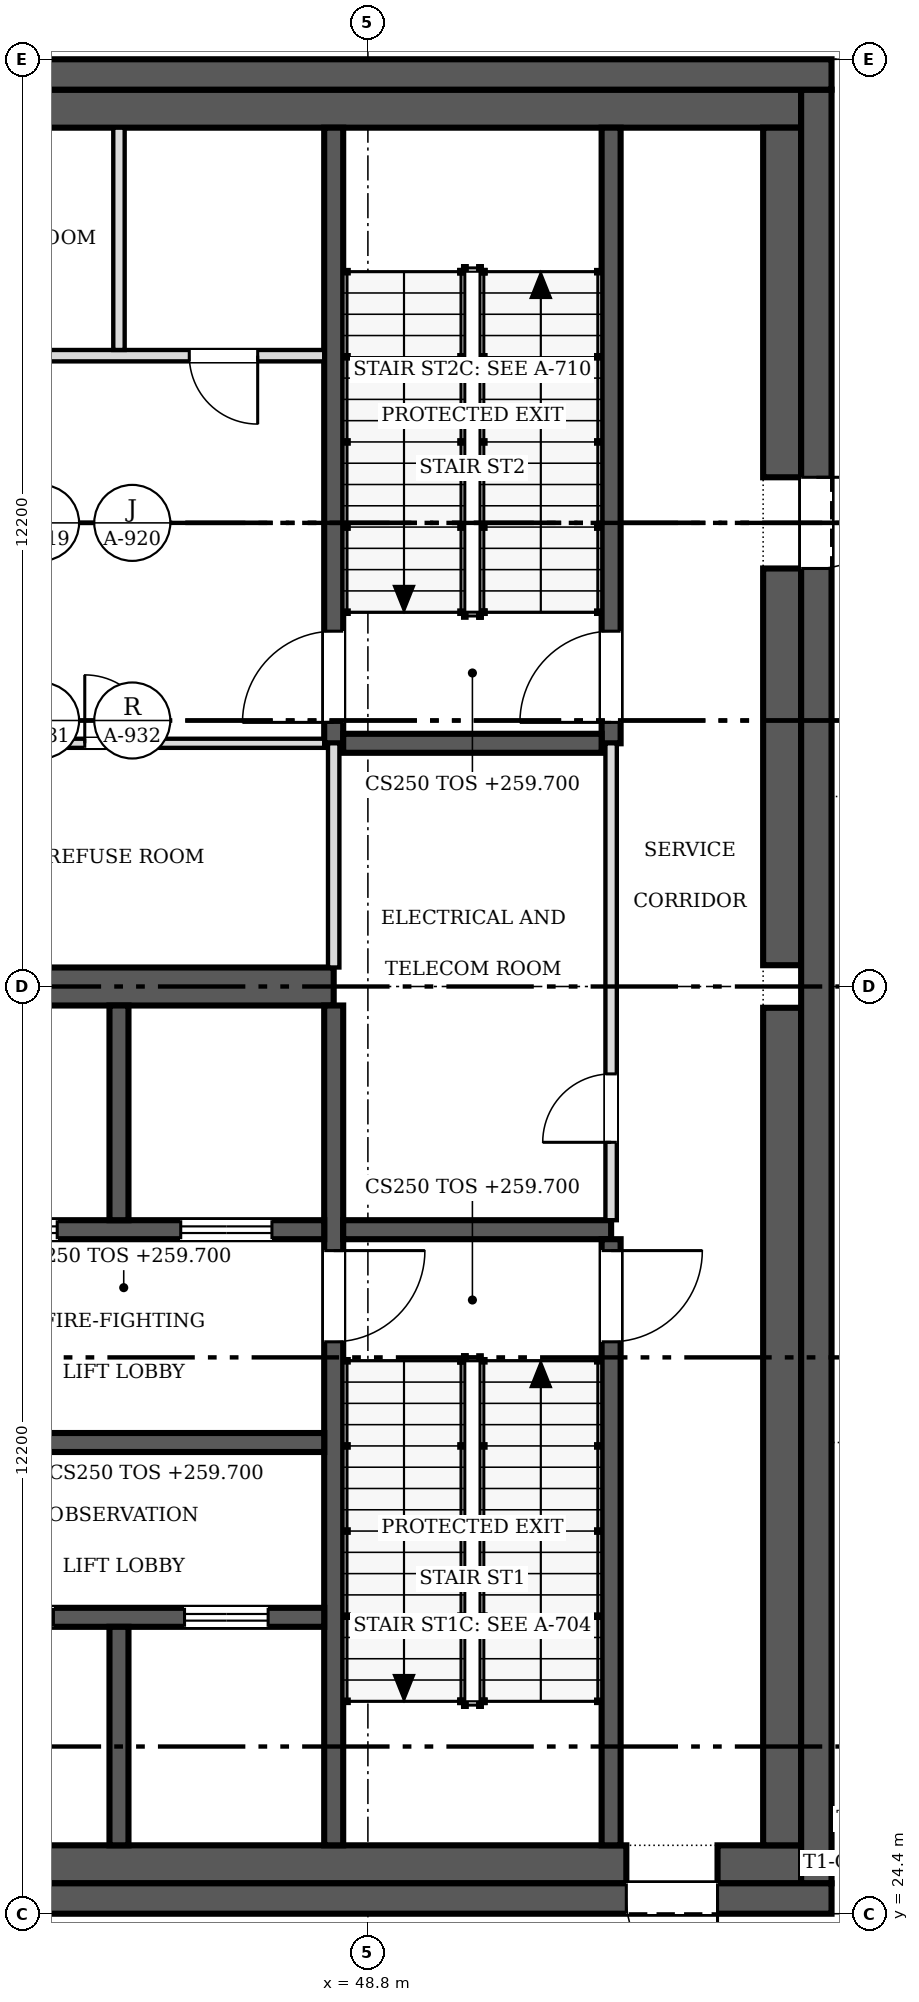
"""IFC4 building model, lengths in metres.
Left out: names, types, materials, properties, quantities, classifications, styles, units other than length and angle.
Written with IfcOpenShell. Run it as: python <this file> out.ifc"""

import sys

from ifc_helpers import new_model, si_unit, direction, frame, frame_2d, origin, place, context, subcontext, project, spatial, rectangle, extrude, source, transform, mapped, element, fill, save


model = new_model("IFC4")
c1 = context("Model", 3, precision=1e-05, world=origin(), true_north=direction((0.0, 1.0)))
c2 = subcontext(c1, "Body", "Model", "MODEL_VIEW")
j1 = project(units=[si_unit("LENGTHUNIT", "METRE"), si_unit("PLANEANGLEUNIT", "RADIAN")], contexts=[c1])
p1 = place(None, origin())
s1 = spatial("IfcSite", under=j1, at=p1, CompositionType="ELEMENT")
p2 = place(p1, origin())
s2 = spatial("IfcBuilding", under=s1, at=p2, CompositionType="ELEMENT")
p3 = place(p2, frame((0.0, 0.0, 259.7)))
s3 = spatial("IfcBuildingStorey", under=s2, at=p3, CompositionType="ELEMENT", Elevation=259.7)
p4 = place(p3, frame((54.9, 24.6, 0.0), z_axis=(0.0, 0.0, 1.0), x_axis=(-1.0, 0.0, 0.0)))
e1 = element("IfcWall", 1, at=p4, inside=s3, PredefinedType="SHEAR", context=c2, shape_type="SweptSolid", body=[
    extrude(rectangle(XDim=24.4, YDim=0.4, at=frame_2d((12.2, 0.0))), origin(), (0.0, 0.0, 1.0), 6.0),
])
m1 = source(origin(), c2, "Body", "SweptSolid", [
    extrude(rectangle(XDim=1.2, YDim=2.1, at=frame_2d((0.6, 1.05))), frame((0.0, 0.21, 0.0), z_axis=(0.0, -1.0, 0.0), x_axis=(1.0, 0.0, 0.0)), (0.0, 0.0, 1.0), 0.42),
])
p5 = place(p4, frame((1.5, 0.0, 0.0)))
e2 = element("IfcOpeningElement", 2, at=p5, cuts=e1, PredefinedType="OPENING", context=c2, shape_type="MappedRepresentation", body=[
    mapped(m1, transform((0.0, 0.0, 0.0), scale=1.0)),
])
p6 = place(p3, frame((30.5, 48.6, 0.0), z_axis=(0.0, 0.0, 1.0), x_axis=(1.0, 0.0, 0.0)))
e3 = element("IfcWall", 3, at=p6, inside=s3, PredefinedType="SHEAR", context=c2, shape_type="SweptSolid", body=[
    extrude(rectangle(XDim=24.4, YDim=0.4, at=frame_2d((12.2, 0.0))), origin(), (0.0, 0.0, 1.0), 6.0),
])
p7 = place(p3, frame((54.7, 48.4, 0.0), z_axis=(0.0, 0.0, 1.0), x_axis=(0.0, -1.0, 0.0)))
e4 = element("IfcWall", 4, at=p7, inside=s3, PredefinedType="SHEAR", context=c2, shape_type="SweptSolid", body=[
    extrude(rectangle(XDim=23.6, YDim=0.4, at=frame_2d((11.8, 0.0))), origin(), (0.0, 0.0, 1.0), 6.0),
])
p8 = place(p7, frame((5.1, 0.0, 0.0)))
e5 = element("IfcOpeningElement", 5, at=p8, cuts=e4, PredefinedType="OPENING", context=c2, shape_type="MappedRepresentation", body=[
    mapped(m1, transform((0.0, 0.0, 0.0), scale=1.0)),
])
p9 = place(p3, frame((30.9, 25.05, 0.0), z_axis=(0.0, 0.0, 1.0), x_axis=(1.0, 0.0, 0.0)))
e6 = element("IfcWall", 6, at=p9, inside=s3, PredefinedType="SOLIDWALL", context=c2, shape_type="SweptSolid", body=[
    extrude(rectangle(XDim=21.3, YDim=0.5, at=frame_2d((10.65, 0.0))), origin(), (0.0, 0.0, 1.0), 6.0),
])
p10 = place(p3, frame((53.4, 25.05, 0.0), z_axis=(0.0, 0.0, 1.0), x_axis=(1.0, 0.0, 0.0)))
e7 = element("IfcWall", 7, at=p10, inside=s3, PredefinedType="SOLIDWALL", context=c2, shape_type="SweptSolid", body=[
    extrude(rectangle(XDim=1.1, YDim=0.5, at=frame_2d((0.55, 0.0))), origin(), (0.0, 0.0, 1.0), 6.0),
])
p11 = place(p3, frame((30.9, 48.15, 0.0), z_axis=(0.0, 0.0, 1.0), x_axis=(1.0, 0.0, 0.0)))
e8 = element("IfcWall", 8, at=p11, inside=s3, PredefinedType="SOLIDWALL", context=c2, shape_type="SweptSolid", body=[
    extrude(rectangle(XDim=23.6, YDim=0.5, at=frame_2d((11.8, 0.0))), origin(), (0.0, 0.0, 1.0), 6.0),
])
p12 = place(p3, frame((54.25, 25.3, 0.0), z_axis=(0.0, 0.0, 1.0), x_axis=(0.0, 1.0, 0.0)))
e9 = element("IfcWall", 9, at=p12, inside=s3, PredefinedType="SOLIDWALL", context=c2, shape_type="SweptSolid", body=[
    extrude(rectangle(XDim=11.02, YDim=0.5, at=frame_2d((5.51, 0.0))), origin(), (0.0, 0.0, 1.0), 6.0),
])
p13 = place(p3, frame((54.25, 36.88, 0.0), z_axis=(0.0, 0.0, 1.0), x_axis=(0.0, 1.0, 0.0)))
e10 = element("IfcWall", 10, at=p13, inside=s3, PredefinedType="SOLIDWALL", context=c2, shape_type="SweptSolid", body=[
    extrude(rectangle(XDim=5.22, YDim=0.5, at=frame_2d((2.61, 0.0))), origin(), (0.0, 0.0, 1.0), 6.0),
])
p14 = place(p3, frame((54.25, 43.3, 0.0), z_axis=(0.0, 0.0, 1.0), x_axis=(0.0, 1.0, 0.0)))
e11 = element("IfcWall", 11, at=p14, inside=s3, PredefinedType="SOLIDWALL", context=c2, shape_type="SweptSolid", body=[
    extrude(rectangle(XDim=4.6, YDim=0.5, at=frame_2d((2.3, 0.0))), origin(), (0.0, 0.0, 1.0), 6.0),
])
p15 = place(p3, frame((31.4, 36.6, 0.0), z_axis=(0.0, 0.0, 1.0), x_axis=(1.0, 0.0, 0.0)))
e12 = element("IfcWall", 12, at=p15, inside=s3, PredefinedType="SHEAR", context=c2, shape_type="SweptSolid", body=[
    extrude(rectangle(XDim=16.95, YDim=0.5, at=frame_2d((8.475, 0.0))), origin(), (0.0, 0.0, 1.0), 6.0),
])
p16 = place(p3, frame((48.35, 36.35, 0.0), z_axis=(0.0, 0.0, 1.0), x_axis=(0.0, -1.0, 0.0)))
e13 = element("IfcWall", 13, at=p16, inside=s3, PredefinedType="SOLIDWALL", context=c2, shape_type="SweptSolid", body=[
    extrude(rectangle(XDim=11.05, YDim=0.25, at=frame_2d((5.525, 0.0))), origin(), (0.0, 0.0, 1.0), 6.0),
])
m2 = source(origin(), c2, "Body", "SweptSolid", [
    extrude(rectangle(XDim=1.2, YDim=2.1, at=frame_2d((0.6, 1.05))), frame((0.0, 0.135, 0.0), z_axis=(0.0, -1.0, 0.0), x_axis=(1.0, 0.0, 0.0)), (0.0, 0.0, 1.0), 0.27),
])
p17 = place(p16, frame((3.225, 0.0, 0.0)))
e14 = element("IfcOpeningElement", 14, at=p17, cuts=e13, PredefinedType="OPENING", context=c2, shape_type="MappedRepresentation", body=[
    mapped(m2, transform((0.0, 0.0, 0.0), scale=1.0)),
])
p18 = place(p3, frame((48.225, 33.4, 0.0), z_axis=(0.0, 0.0, 1.0), x_axis=(-1.0, 0.0, 0.0)))
e15 = element("IfcWall", 15, at=p18, inside=s3, PredefinedType="SOLIDWALL", context=c2, shape_type="SweptSolid", body=[
    extrude(rectangle(XDim=5.275, YDim=0.25, at=frame_2d((2.638, 0.0))), origin(), (0.0, 0.0, 1.0), 6.0),
])
p19 = place(p18, frame((3.512, 0.0, 0.0)))
e16 = element("IfcOpeningElement", 16, at=p19, cuts=e15, PredefinedType="OPENING", context=c2, shape_type="MappedRepresentation", body=[
    mapped(m2, transform((0.0, 0.0, 0.0), scale=1.0)),
])
p20 = place(p18, frame((0.688, 0.0, 0.0)))
e17 = element("IfcOpeningElement", 17, at=p20, cuts=e15, PredefinedType="OPENING", context=c2, shape_type="MappedRepresentation", body=[
    mapped(m2, transform((0.0, 0.0, 0.0), scale=1.0)),
])
p21 = place(p3, frame((48.475, 33.4, 0.0), z_axis=(0.0, 0.0, 1.0), x_axis=(1.0, 0.0, 0.0)))
e18 = element("IfcWall", 18, at=p21, inside=s3, PredefinedType="SOLIDWALL", context=c2, shape_type="SweptSolid", body=[
    extrude(rectangle(XDim=3.525, YDim=0.25, at=frame_2d((1.762, 0.0))), origin(), (0.0, 0.0, 1.0), 6.0),
])
p22 = place(p3, frame((48.35, 47.9, 0.0), z_axis=(0.0, 0.0, 1.0), x_axis=(0.0, -1.0, 0.0)))
e19 = element("IfcWall", 19, at=p22, inside=s3, PredefinedType="SOLIDWALL", context=c2, shape_type="SweptSolid", body=[
    extrude(rectangle(XDim=8.1, YDim=0.25, at=frame_2d((4.05, 0.0))), origin(), (0.0, 0.0, 1.0), 6.0),
])
p23 = place(p22, frame((6.625, 0.0, 0.0)))
e20 = element("IfcOpeningElement", 20, at=p23, cuts=e19, PredefinedType="OPENING", context=c2, shape_type="MappedRepresentation", body=[
    mapped(m2, transform((0.0, 0.0, 0.0), scale=1.0)),
])
p24 = place(p3, frame((52.0, 25.3, 0.0), z_axis=(0.0, 0.0, 1.0), x_axis=(0.0, 1.0, 0.0)))
e21 = element("IfcWall", 21, at=p24, inside=s3, PredefinedType="SOLIDWALL", context=c2, shape_type="SweptSolid", body=[
    extrude(rectangle(XDim=7.975, YDim=0.25, at=frame_2d((3.987, 0.0))), origin(), (0.0, 0.0, 1.0), 6.0),
])
p25 = place(p24, frame((6.625, 0.0, 0.0)))
e22 = element("IfcOpeningElement", 22, at=p25, cuts=e21, PredefinedType="OPENING", context=c2, shape_type="MappedRepresentation", body=[
    mapped(m2, transform((0.0, 0.0, 0.0), scale=1.0)),
])
p26 = place(p3, frame((52.0, 39.8, 0.0), z_axis=(0.0, 0.0, 1.0), x_axis=(0.0, 1.0, 0.0)))
e23 = element("IfcWall", 23, at=p26, inside=s3, PredefinedType="SOLIDWALL", context=c2, shape_type="SweptSolid", body=[
    extrude(rectangle(XDim=8.1, YDim=0.25, at=frame_2d((4.05, 0.0))), origin(), (0.0, 0.0, 1.0), 6.0),
])
p27 = place(p26, frame((0.275, 0.0, 0.0)))
e24 = element("IfcOpeningElement", 24, at=p27, cuts=e23, PredefinedType="OPENING", context=c2, shape_type="MappedRepresentation", body=[
    mapped(m2, transform((0.0, 0.0, 0.0), scale=1.0)),
])
p28 = place(p3, frame((42.95, 28.3, 0.0), z_axis=(0.0, 0.0, 1.0), x_axis=(1.0, 0.0, 0.0)))
e25 = element("IfcWall", 25, at=p28, inside=s3, PredefinedType="SOLIDWALL", context=c2, shape_type="SweptSolid", body=[
    extrude(rectangle(XDim=5.275, YDim=0.25, at=frame_2d((2.638, 0.0))), origin(), (0.0, 0.0, 1.0), 6.0),
])
m3 = source(origin(), c2, "Body", "SweptSolid", [
    extrude(rectangle(XDim=1.1, YDim=2.1, at=frame_2d((0.55, 1.05))), frame((0.0, 0.135, 0.0), z_axis=(0.0, -1.0, 0.0), x_axis=(1.0, 0.0, 0.0)), (0.0, 0.0, 1.0), 0.27),
])
p29 = place(p28, frame((0.613, 0.0, 0.0)))
e26 = element("IfcOpeningElement", 26, at=p29, cuts=e25, PredefinedType="OPENING", context=c2, shape_type="MappedRepresentation", body=[
    mapped(m3, transform((0.0, 0.0, 0.0), scale=1.0)),
])
p30 = place(p28, frame((3.438, 0.0, 0.0)))
e27 = element("IfcOpeningElement", 27, at=p30, cuts=e25, PredefinedType="OPENING", context=c2, shape_type="MappedRepresentation", body=[
    mapped(m3, transform((0.0, 0.0, 0.0), scale=1.0)),
])
p31 = place(p3, frame((42.95, 30.6, 0.0), z_axis=(0.0, 0.0, 1.0), x_axis=(1.0, 0.0, 0.0)))
e28 = element("IfcWall", 28, at=p31, inside=s3, PredefinedType="SOLIDWALL", context=c2, shape_type="SweptSolid", body=[
    extrude(rectangle(XDim=5.275, YDim=0.25, at=frame_2d((2.638, 0.0))), origin(), (0.0, 0.0, 1.0), 6.0),
])
p32 = place(p3, frame((48.475, 39.8, 0.0), z_axis=(0.0, 0.0, 1.0), x_axis=(1.0, 0.0, 0.0)))
e29 = element("IfcWall", 29, at=p32, inside=s3, PredefinedType="SOLIDWALL", context=c2, shape_type="SweptSolid", body=[
    extrude(rectangle(XDim=3.4, YDim=0.25, at=frame_2d((1.7, 0.0))), origin(), (0.0, 0.0, 1.0), 6.0),
])
p33 = place(p3, frame((45.525, 33.525, 0.0), z_axis=(0.0, 0.0, 1.0), x_axis=(0.0, 1.0, 0.0)))
e30 = element("IfcWall", 30, at=p33, inside=s3, PredefinedType="SOLIDWALL", context=c2, shape_type="SweptSolid", body=[
    extrude(rectangle(XDim=2.825, YDim=0.25, at=frame_2d((1.413, 0.0))), origin(), (0.0, 0.0, 1.0), 6.0),
])
p34 = place(p3, frame((45.525, 25.3, 0.0), z_axis=(0.0, 0.0, 1.0), x_axis=(0.0, 1.0, 0.0)))
e31 = element("IfcWall", 31, at=p34, inside=s3, PredefinedType="SOLIDWALL", context=c2, shape_type="SweptSolid", body=[
    extrude(rectangle(XDim=2.875, YDim=0.25, at=frame_2d((1.438, 0.0))), origin(), (0.0, 0.0, 1.0), 6.0),
])
p35 = place(p3, frame((52.0, 33.525, 0.0), z_axis=(0.0, 0.0, 1.0), x_axis=(0.0, 1.0, 0.0)))
e32 = element("IfcWall", 32, at=p35, inside=s3, PredefinedType="PARTITIONING", context=c2, shape_type="SweptSolid", body=[
    extrude(rectangle(XDim=6.275, YDim=0.15, at=frame_2d((3.138, 0.0))), origin(), (0.0, 0.0, 1.0), 5.75),
])
m4 = source(origin(), c2, "Body", "SweptSolid", [
    extrude(rectangle(XDim=0.9, YDim=2.1, at=frame_2d((0.45, 1.05))), frame((0.0, 0.085, 0.0), z_axis=(0.0, -1.0, 0.0), x_axis=(1.0, 0.0, 0.0)), (0.0, 0.0, 1.0), 0.17),
])
p36 = place(p35, frame((1.025, 0.0, 0.0)))
e33 = element("IfcOpeningElement", 33, at=p36, cuts=e32, PredefinedType="OPENING", context=c2, shape_type="MappedRepresentation", body=[
    mapped(m4, transform((0.0, 0.0, 0.0), scale=1.0)),
])
p37 = place(p3, frame((48.225, 39.8, 0.0), z_axis=(0.0, 0.0, 1.0), x_axis=(-1.0, 0.0, 0.0)))
e34 = element("IfcWall", 34, at=p37, inside=s3, PredefinedType="PARTITIONING", context=c2, shape_type="SweptSolid", body=[
    extrude(rectangle(XDim=5.275, YDim=0.12, at=frame_2d((2.638, 0.0))), origin(), (0.0, 0.0, 1.0), 5.75),
])
m5 = source(origin(), c2, "Body", "SweptSolid", [
    extrude(rectangle(XDim=0.9, YDim=2.1, at=frame_2d((0.45, 1.05))), frame((0.0, 0.07, 0.0), z_axis=(0.0, -1.0, 0.0), x_axis=(1.0, 0.0, 0.0)), (0.0, 0.0, 1.0), 0.14),
])
p38 = place(p37, frame((2.25, 0.0, 0.0)))
e35 = element("IfcOpeningElement", 35, at=p38, cuts=e34, PredefinedType="OPENING", context=c2, shape_type="MappedRepresentation", body=[
    mapped(m5, transform((0.0, 0.0, 0.0), scale=1.0)),
])
p39 = place(p3, frame((42.95, 44.9, 0.0), z_axis=(0.0, 0.0, 1.0), x_axis=(1.0, 0.0, 0.0)))
e36 = element("IfcWall", 36, at=p39, inside=s3, PredefinedType="PARTITIONING", context=c2, shape_type="SweptSolid", body=[
    extrude(rectangle(XDim=5.275, YDim=0.15, at=frame_2d((2.638, 0.0))), origin(), (0.0, 0.0, 1.0), 5.75),
])
p40 = place(p39, frame((0.712, 0.0, 0.0)))
e37 = element("IfcOpeningElement", 37, at=p40, cuts=e36, PredefinedType="OPENING", context=c2, shape_type="MappedRepresentation", body=[
    mapped(m4, transform((0.0, 0.0, 0.0), scale=1.0)),
])
p41 = place(p39, frame((3.5, 0.0, 0.0)))
e38 = element("IfcOpeningElement", 38, at=p41, cuts=e36, PredefinedType="OPENING", context=c2, shape_type="MappedRepresentation", body=[
    mapped(m4, transform((0.0, 0.0, 0.0), scale=1.0)),
])
p42 = place(p3, frame((48.35, 36.85, 0.0), z_axis=(0.0, 0.0, 1.0), x_axis=(0.0, 1.0, 0.0)))
e39 = element("IfcWall", 39, at=p42, inside=s3, PredefinedType="PARTITIONING", context=c2, shape_type="SweptSolid", body=[
    extrude(rectangle(XDim=2.95, YDim=0.15, at=frame_2d((1.475, 0.0))), origin(), (0.0, 0.0, 1.0), 5.75),
])
p43 = place(p3, frame((45.525, 44.975, 0.0), z_axis=(0.0, 0.0, 1.0), x_axis=(0.0, 1.0, 0.0)))
e40 = element("IfcWall", 40, at=p43, inside=s3, PredefinedType="PARTITIONING", context=c2, shape_type="SweptSolid", body=[
    extrude(rectangle(XDim=2.925, YDim=0.15, at=frame_2d((1.462, 0.0))), origin(), (0.0, 0.0, 1.0), 5.75),
])
m6 = source(origin(), c2, "Body", "SweptSolid", [
    extrude(rectangle(XDim=1.2, YDim=2.1, at=frame_2d((0.6, 1.05))), frame((0.0, 0.025, 0.0), z_axis=(0.0, -1.0, 0.0), x_axis=(1.0, 0.0, 0.0)), (0.0, 0.0, 1.0), 0.05),
])
p44 = place(p5, origin())
e41 = element("IfcDoor", 41, at=p44, inside=s3, OperationType="SINGLE_SWING_LEFT", PredefinedType="DOOR", context=c2, shape_type="MappedRepresentation", body=[
    mapped(m6, transform((0.0, 0.0, 0.0), scale=1.0)),
])
fill(e2, e41)
p45 = place(p8, origin())
e42 = element("IfcDoor", 42, at=p45, inside=s3, OperationType="SINGLE_SWING_LEFT", PredefinedType="DOOR", context=c2, shape_type="MappedRepresentation", body=[
    mapped(m6, transform((0.0, 0.0, 0.0), scale=1.0)),
])
fill(e5, e42)
p46 = place(p17, origin())
e43 = element("IfcDoor", 43, at=p46, inside=s3, OperationType="SINGLE_SWING_LEFT", PredefinedType="DOOR", context=c2, shape_type="MappedRepresentation", body=[
    mapped(m6, transform((0.0, 0.0, 0.0), scale=1.0)),
])
fill(e14, e43)
p47 = place(p19, origin())
e44 = element("IfcDoor", 44, at=p47, inside=s3, OperationType="DOUBLE_DOOR_SLIDING", PredefinedType="DOOR", context=c2, shape_type="MappedRepresentation", body=[
    mapped(m6, transform((0.0, 0.0, 0.0), scale=1.0)),
])
fill(e16, e44)
p48 = place(p20, origin())
e45 = element("IfcDoor", 45, at=p48, inside=s3, OperationType="DOUBLE_DOOR_SLIDING", PredefinedType="DOOR", context=c2, shape_type="MappedRepresentation", body=[
    mapped(m6, transform((0.0, 0.0, 0.0), scale=1.0)),
])
fill(e17, e45)
p49 = place(p23, origin())
e46 = element("IfcDoor", 46, at=p49, inside=s3, OperationType="SINGLE_SWING_RIGHT", PredefinedType="DOOR", context=c2, shape_type="MappedRepresentation", body=[
    mapped(m6, transform((0.0, 0.0, 0.0), scale=1.0)),
])
fill(e20, e46)
p50 = place(p25, origin())
e47 = element("IfcDoor", 47, at=p50, inside=s3, OperationType="SINGLE_SWING_RIGHT", PredefinedType="DOOR", context=c2, shape_type="MappedRepresentation", body=[
    mapped(m6, transform((0.0, 0.0, 0.0), scale=1.0)),
])
fill(e22, e47)
p51 = place(p27, origin())
e48 = element("IfcDoor", 48, at=p51, inside=s3, OperationType="SINGLE_SWING_LEFT", PredefinedType="DOOR", context=c2, shape_type="MappedRepresentation", body=[
    mapped(m6, transform((0.0, 0.0, 0.0), scale=1.0)),
])
fill(e24, e48)
m7 = source(origin(), c2, "Body", "SweptSolid", [
    extrude(rectangle(XDim=1.1, YDim=2.1, at=frame_2d((0.55, 1.05))), frame((0.0, 0.025, 0.0), z_axis=(0.0, -1.0, 0.0), x_axis=(1.0, 0.0, 0.0)), (0.0, 0.0, 1.0), 0.05),
])
p52 = place(p29, origin())
e49 = element("IfcDoor", 49, at=p52, inside=s3, OperationType="DOUBLE_DOOR_SLIDING", PredefinedType="DOOR", context=c2, shape_type="MappedRepresentation", body=[
    mapped(m7, transform((0.0, 0.0, 0.0), scale=1.0)),
])
fill(e26, e49)
p53 = place(p30, origin())
e50 = element("IfcDoor", 50, at=p53, inside=s3, OperationType="DOUBLE_DOOR_SLIDING", PredefinedType="DOOR", context=c2, shape_type="MappedRepresentation", body=[
    mapped(m7, transform((0.0, 0.0, 0.0), scale=1.0)),
])
fill(e27, e50)
m8 = source(origin(), c2, "Body", "SweptSolid", [
    extrude(rectangle(XDim=0.9, YDim=2.1, at=frame_2d((0.45, 1.05))), frame((0.0, 0.025, 0.0), z_axis=(0.0, -1.0, 0.0), x_axis=(1.0, 0.0, 0.0)), (0.0, 0.0, 1.0), 0.05),
])
p54 = place(p36, origin())
e51 = element("IfcDoor", 51, at=p54, inside=s3, OperationType="SINGLE_SWING_LEFT", PredefinedType="DOOR", context=c2, shape_type="MappedRepresentation", body=[
    mapped(m8, transform((0.0, 0.0, 0.0), scale=1.0)),
])
fill(e33, e51)
p55 = place(p38, origin())
e52 = element("IfcDoor", 52, at=p55, inside=s3, OperationType="SINGLE_SWING_RIGHT", PredefinedType="DOOR", context=c2, shape_type="MappedRepresentation", body=[
    mapped(m8, transform((0.0, 0.0, 0.0), scale=1.0)),
])
fill(e35, e52)
p56 = place(p41, origin())
e53 = element("IfcDoor", 53, at=p56, inside=s3, OperationType="SINGLE_SWING_RIGHT", PredefinedType="DOOR", context=c2, shape_type="MappedRepresentation", body=[
    mapped(m8, transform((0.0, 0.0, 0.0), scale=1.0)),
])
fill(e38, e53)
save(model, sys.argv[1])
